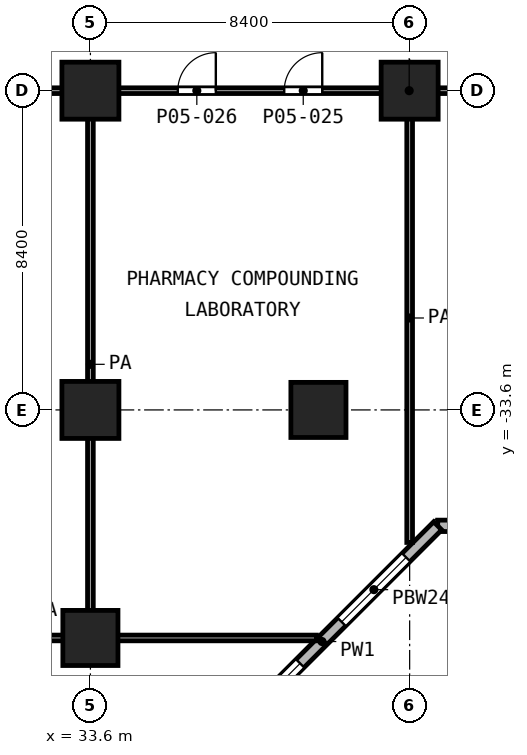
"""IFC4 building model, lengths in metres.
Left out: names, types, materials, properties, quantities, classifications, styles, units other than length and angle.
Written with IfcOpenShell. Run it as: python <this file> out.ifc"""

import sys

from ifc_helpers import new_model, si_unit, direction, frame, frame_2d, origin, origin_2d, place, context, subcontext, project, spatial, rectangle, extrude, element, fill, save


model = new_model("IFC4")
c1 = context("Model", 3, precision=1e-05, world=origin(), true_north=direction((0.0, 1.0)))
c2 = subcontext(c1, "Body", "Model", "MODEL_VIEW")
j1 = project(units=[si_unit("LENGTHUNIT", "METRE"), si_unit("PLANEANGLEUNIT", "RADIAN")], contexts=[c1])
p1 = place(None, origin())
s1 = spatial("IfcSite", under=j1, at=p1, CompositionType="ELEMENT")
p2 = place(p1, origin())
s2 = spatial("IfcBuilding", under=s1, at=p2, CompositionType="ELEMENT")
p3 = place(p2, frame((0.0, 0.0, 23.8)))
s3 = spatial("IfcBuildingStorey", under=s2, at=p3, CompositionType="ELEMENT", Elevation=23.8)
for number, where, z_axis, x_axis in (
    (1, (33.6, -25.2, 0.0), (0.0, 0.0, 1.0), (1.0, 0.0, 0.0)),
    (2, (42.0, -25.2, 0.0), (0.0, 0.0, 1.0), (1.0, 0.0, 0.0)),
    (3, (33.6, -33.6, 0.0), (0.0, 0.0, 1.0), (1.0, 0.0, 0.0)),
):
    element("IfcColumn", number, at=place(p3, frame(where, z_axis=z_axis, x_axis=x_axis)), inside=s3, PredefinedType="COLUMN", context=c2, shape_type="SweptSolid", body=[
        extrude(rectangle(XDim=1.5, YDim=1.5, at=origin_2d()), origin(), (0.0, 0.0, 1.0), 5.2),
    ])
for number, where, z_axis, x_axis in (
    (4, (39.6, -33.6, 0.0), (0.0, 0.0, 1.0), (1.0, 0.0, 0.0)),
    (5, (33.6, -39.6, 0.0), (0.0, 0.0, 1.0), (1.0, 0.0, 0.0)),
):
    element("IfcColumn", number, at=place(p3, frame(where, z_axis=z_axis, x_axis=x_axis)), inside=s3, PredefinedType="COLUMN", context=c2, shape_type="SweptSolid", body=[
        extrude(rectangle(XDim=1.45, YDim=1.45, at=origin_2d()), origin(), (0.0, 0.0, 1.0), 5.2),
    ])
p4 = place(p3, frame((36.65, -42.738, 0.0), z_axis=(0.0, 0.0, 1.0), x_axis=(0.707106781187, 0.707106781187, 0.0)))
e6 = element("IfcWall", 6, at=p4, inside=s3, PredefinedType="SOLIDWALL", context=c2, shape_type="SweptSolid", body=[
    extrude(rectangle(XDim=8.61, YDim=0.3, at=frame_2d((4.305, 0.0))), origin(), (0.0, 0.0, 1.0), 4.85),
])
p5 = place(p4, frame((1.09, 0.0, 0.9)))
e7 = element("IfcOpeningElement", 7, at=p5, cuts=e6, PredefinedType="OPENING", context=c2, shape_type="SweptSolid", body=[
    extrude(rectangle(XDim=2.4, YDim=3.0, at=frame_2d((1.2, 1.5))), frame((0.0, 0.16, 0.0), z_axis=(0.0, -1.0, 0.0), x_axis=(1.0, 0.0, 0.0)), (0.0, 0.0, 1.0), 0.32),
])
p6 = place(p4, frame((5.035, 0.0, 0.9)))
e8 = element("IfcOpeningElement", 8, at=p6, cuts=e6, PredefinedType="OPENING", context=c2, shape_type="SweptSolid", body=[
    extrude(rectangle(XDim=2.4, YDim=3.0, at=frame_2d((1.2, 1.5))), frame((0.0, 0.16, 0.0), z_axis=(0.0, -1.0, 0.0), x_axis=(1.0, 0.0, 0.0)), (0.0, 0.0, 1.0), 0.32),
])
p7 = place(p3, frame((42.738, -36.65, 0.0), z_axis=(0.0, 0.0, 1.0), x_axis=(1.0, 0.0, 0.0)))
e9 = element("IfcWall", 9, at=p7, inside=s3, PredefinedType="SOLIDWALL", context=c2, shape_type="SweptSolid", body=[
    extrude(rectangle(XDim=46.8, YDim=0.3, at=frame_2d((23.4, 0.0))), origin(), (0.0, 0.0, 1.0), 4.85),
])
p8 = place(p7, frame((0.562, 0.0, 0.9)))
e10 = element("IfcOpeningElement", 10, at=p8, cuts=e9, PredefinedType="OPENING", context=c2, shape_type="SweptSolid", body=[
    extrude(rectangle(XDim=2.4, YDim=3.0, at=frame_2d((1.2, 1.5))), frame((0.0, 0.16, 0.0), z_axis=(0.0, -1.0, 0.0), x_axis=(1.0, 0.0, 0.0)), (0.0, 0.0, 1.0), 0.32),
])
p9 = place(p7, frame((3.762, 0.0, 0.9)))
e11 = element("IfcOpeningElement", 11, at=p9, cuts=e9, PredefinedType="OPENING", context=c2, shape_type="SweptSolid", body=[
    extrude(rectangle(XDim=3.6, YDim=3.0, at=frame_2d((1.8, 1.5))), frame((0.0, 0.16, 0.0), z_axis=(0.0, -1.0, 0.0), x_axis=(1.0, 0.0, 0.0)), (0.0, 0.0, 1.0), 0.32),
])
p10 = place(p7, frame((7.962, 0.0, 0.9)))
e12 = element("IfcOpeningElement", 12, at=p10, cuts=e9, PredefinedType="OPENING", context=c2, shape_type="SweptSolid", body=[
    extrude(rectangle(XDim=3.6, YDim=3.0, at=frame_2d((1.8, 1.5))), frame((0.0, 0.16, 0.0), z_axis=(0.0, -1.0, 0.0), x_axis=(1.0, 0.0, 0.0)), (0.0, 0.0, 1.0), 0.32),
])
p11 = place(p7, frame((12.162, 0.0, 0.9)))
e13 = element("IfcOpeningElement", 13, at=p11, cuts=e9, PredefinedType="OPENING", context=c2, shape_type="SweptSolid", body=[
    extrude(rectangle(XDim=3.6, YDim=3.0, at=frame_2d((1.8, 1.5))), frame((0.0, 0.16, 0.0), z_axis=(0.0, -1.0, 0.0), x_axis=(1.0, 0.0, 0.0)), (0.0, 0.0, 1.0), 0.32),
])
p12 = place(p7, frame((16.362, 0.0, 0.9)))
e14 = element("IfcOpeningElement", 14, at=p12, cuts=e9, PredefinedType="OPENING", context=c2, shape_type="SweptSolid", body=[
    extrude(rectangle(XDim=3.6, YDim=3.0, at=frame_2d((1.8, 1.5))), frame((0.0, 0.16, 0.0), z_axis=(0.0, -1.0, 0.0), x_axis=(1.0, 0.0, 0.0)), (0.0, 0.0, 1.0), 0.32),
])
p13 = place(p7, frame((20.562, 0.0, 0.9)))
e15 = element("IfcOpeningElement", 15, at=p13, cuts=e9, PredefinedType="OPENING", context=c2, shape_type="SweptSolid", body=[
    extrude(rectangle(XDim=3.6, YDim=3.0, at=frame_2d((1.8, 1.5))), frame((0.0, 0.16, 0.0), z_axis=(0.0, -1.0, 0.0), x_axis=(1.0, 0.0, 0.0)), (0.0, 0.0, 1.0), 0.32),
])
p14 = place(p7, frame((25.287, 0.0, 0.9)))
e16 = element("IfcOpeningElement", 16, at=p14, cuts=e9, PredefinedType="OPENING", context=c2, shape_type="SweptSolid", body=[
    extrude(rectangle(XDim=2.4, YDim=3.0, at=frame_2d((1.2, 1.5))), frame((0.0, 0.16, 0.0), z_axis=(0.0, -1.0, 0.0), x_axis=(1.0, 0.0, 0.0)), (0.0, 0.0, 1.0), 0.32),
])
p15 = place(p7, frame((28.962, 0.0, 0.9)))
e17 = element("IfcOpeningElement", 17, at=p15, cuts=e9, PredefinedType="OPENING", context=c2, shape_type="SweptSolid", body=[
    extrude(rectangle(XDim=3.6, YDim=3.0, at=frame_2d((1.8, 1.5))), frame((0.0, 0.16, 0.0), z_axis=(0.0, -1.0, 0.0), x_axis=(1.0, 0.0, 0.0)), (0.0, 0.0, 1.0), 0.32),
])
p16 = place(p7, frame((33.162, 0.0, 0.9)))
e18 = element("IfcOpeningElement", 18, at=p16, cuts=e9, PredefinedType="OPENING", context=c2, shape_type="SweptSolid", body=[
    extrude(rectangle(XDim=3.6, YDim=3.0, at=frame_2d((1.8, 1.5))), frame((0.0, 0.16, 0.0), z_axis=(0.0, -1.0, 0.0), x_axis=(1.0, 0.0, 0.0)), (0.0, 0.0, 1.0), 0.32),
])
p17 = place(p7, frame((37.812, 0.0, 0.9)))
e19 = element("IfcOpeningElement", 19, at=p17, cuts=e9, PredefinedType="OPENING", context=c2, shape_type="SweptSolid", body=[
    extrude(rectangle(XDim=1.2, YDim=3.0, at=frame_2d((0.6, 1.5))), frame((0.0, 0.16, 0.0), z_axis=(0.0, -1.0, 0.0), x_axis=(1.0, 0.0, 0.0)), (0.0, 0.0, 1.0), 0.32),
])
p18 = place(p7, frame((41.562, 0.0, 0.9)))
e20 = element("IfcOpeningElement", 20, at=p18, cuts=e9, PredefinedType="OPENING", context=c2, shape_type="SweptSolid", body=[
    extrude(rectangle(XDim=3.6, YDim=3.0, at=frame_2d((1.8, 1.5))), frame((0.0, 0.16, 0.0), z_axis=(0.0, -1.0, 0.0), x_axis=(1.0, 0.0, 0.0)), (0.0, 0.0, 1.0), 0.32),
])
p19 = place(p3, frame((25.275, -39.6, 0.0), z_axis=(0.0, 0.0, 1.0), x_axis=(1.0, 0.0, 0.0)))
e21 = element("IfcWall", 21, at=p19, inside=s3, PredefinedType="PARTITIONING", context=c2, shape_type="SweptSolid", body=[
    extrude(rectangle(XDim=14.272, YDim=0.15, at=frame_2d((7.136, 0.0))), origin(), (0.0, 0.0, 1.0), 4.85),
])
p20 = place(p3, frame((25.275, -25.2, 0.0), z_axis=(0.0, 0.0, 1.0), x_axis=(1.0, 0.0, 0.0)))
e22 = element("IfcWall", 22, at=p20, inside=s3, PredefinedType="PARTITIONING", context=c2, shape_type="SweptSolid", body=[
    extrude(rectangle(XDim=33.425, YDim=0.15, at=frame_2d((16.712, 0.0))), origin(), (0.0, 0.0, 1.0), 4.85),
])
p21 = place(p20, frame((13.425, 0.0, 0.0)))
e23 = element("IfcOpeningElement", 23, at=p21, cuts=e22, PredefinedType="OPENING", context=c2, shape_type="SweptSolid", body=[
    extrude(rectangle(XDim=1.0, YDim=2.1, at=frame_2d((0.5, 1.05))), frame((0.0, 0.085, 0.0), z_axis=(0.0, -1.0, 0.0), x_axis=(1.0, 0.0, 0.0)), (0.0, 0.0, 1.0), 0.17),
])
p22 = place(p20, frame((10.625, 0.0, 0.0)))
e24 = element("IfcOpeningElement", 24, at=p22, cuts=e22, PredefinedType="OPENING", context=c2, shape_type="SweptSolid", body=[
    extrude(rectangle(XDim=1.0, YDim=2.1, at=frame_2d((0.5, 1.05))), frame((0.0, 0.085, 0.0), z_axis=(0.0, -1.0, 0.0), x_axis=(1.0, 0.0, 0.0)), (0.0, 0.0, 1.0), 0.17),
])
p23 = place(p20, frame((21.825, 0.0, 0.0)))
e25 = element("IfcOpeningElement", 25, at=p23, cuts=e22, PredefinedType="OPENING", context=c2, shape_type="SweptSolid", body=[
    extrude(rectangle(XDim=1.0, YDim=2.1, at=frame_2d((0.5, 1.05))), frame((0.0, 0.085, 0.0), z_axis=(0.0, -1.0, 0.0), x_axis=(1.0, 0.0, 0.0)), (0.0, 0.0, 1.0), 0.17),
])
p24 = place(p20, frame((19.025, 0.0, 0.0)))
e26 = element("IfcOpeningElement", 26, at=p24, cuts=e22, PredefinedType="OPENING", context=c2, shape_type="SweptSolid", body=[
    extrude(rectangle(XDim=1.0, YDim=2.1, at=frame_2d((0.5, 1.05))), frame((0.0, 0.085, 0.0), z_axis=(0.0, -1.0, 0.0), x_axis=(1.0, 0.0, 0.0)), (0.0, 0.0, 1.0), 0.17),
])
p25 = place(p20, frame((28.825, 0.0, 0.0)))
e27 = element("IfcOpeningElement", 27, at=p25, cuts=e22, PredefinedType="OPENING", context=c2, shape_type="SweptSolid", body=[
    extrude(rectangle(XDim=1.0, YDim=2.1, at=frame_2d((0.5, 1.05))), frame((0.0, 0.085, 0.0), z_axis=(0.0, -1.0, 0.0), x_axis=(1.0, 0.0, 0.0)), (0.0, 0.0, 1.0), 0.17),
])
p26 = place(p3, frame((33.6, -39.525, 0.0), z_axis=(0.0, 0.0, 1.0), x_axis=(0.0, 1.0, 0.0)))
e28 = element("IfcWall", 28, at=p26, inside=s3, PredefinedType="PARTITIONING", context=c2, shape_type="SweptSolid", body=[
    extrude(rectangle(XDim=14.25, YDim=0.15, at=frame_2d((7.125, 0.0))), origin(), (0.0, 0.0, 1.0), 4.85),
])
p27 = place(p3, frame((42.0, -37.087, 0.0), z_axis=(0.0, 0.0, 1.0), x_axis=(0.0, 1.0, 0.0)))
e29 = element("IfcWall", 29, at=p27, inside=s3, PredefinedType="PARTITIONING", context=c2, shape_type="SweptSolid", body=[
    extrude(rectangle(XDim=11.812, YDim=0.15, at=frame_2d((5.906, 0.0))), origin(), (0.0, 0.0, 1.0), 3.45),
])
p28 = place(p5, origin())
e30 = element("IfcWindow", 30, at=p28, inside=s3, PartitioningType="SINGLE_PANEL", PredefinedType="WINDOW", context=c2, shape_type="SweptSolid", body=[
    extrude(rectangle(XDim=2.4, YDim=3.0, at=frame_2d((1.2, 1.5))), frame((0.0, 0.03, 0.0), z_axis=(0.0, -1.0, 0.0), x_axis=(1.0, 0.0, 0.0)), (0.0, 0.0, 1.0), 0.06),
])
fill(e7, e30)
p29 = place(p6, origin())
e31 = element("IfcWindow", 31, at=p29, inside=s3, PartitioningType="SINGLE_PANEL", PredefinedType="WINDOW", context=c2, shape_type="SweptSolid", body=[
    extrude(rectangle(XDim=2.4, YDim=3.0, at=frame_2d((1.2, 1.5))), frame((0.0, 0.03, 0.0), z_axis=(0.0, -1.0, 0.0), x_axis=(1.0, 0.0, 0.0)), (0.0, 0.0, 1.0), 0.06),
])
fill(e8, e31)
p30 = place(p21, origin())
e32 = element("IfcDoor", 32, at=p30, inside=s3, OperationType="SINGLE_SWING_RIGHT", PredefinedType="DOOR", context=c2, shape_type="SweptSolid", body=[
    extrude(rectangle(XDim=1.0, YDim=2.1, at=frame_2d((0.5, 1.05))), frame((0.0, 0.025, 0.0), z_axis=(0.0, -1.0, 0.0), x_axis=(1.0, 0.0, 0.0)), (0.0, 0.0, 1.0), 0.05),
])
fill(e23, e32)
p31 = place(p22, origin())
e33 = element("IfcDoor", 33, at=p31, inside=s3, OperationType="SINGLE_SWING_RIGHT", PredefinedType="DOOR", context=c2, shape_type="SweptSolid", body=[
    extrude(rectangle(XDim=1.0, YDim=2.1, at=frame_2d((0.5, 1.05))), frame((0.0, 0.025, 0.0), z_axis=(0.0, -1.0, 0.0), x_axis=(1.0, 0.0, 0.0)), (0.0, 0.0, 1.0), 0.05),
])
fill(e24, e33)
save(model, sys.argv[1])
